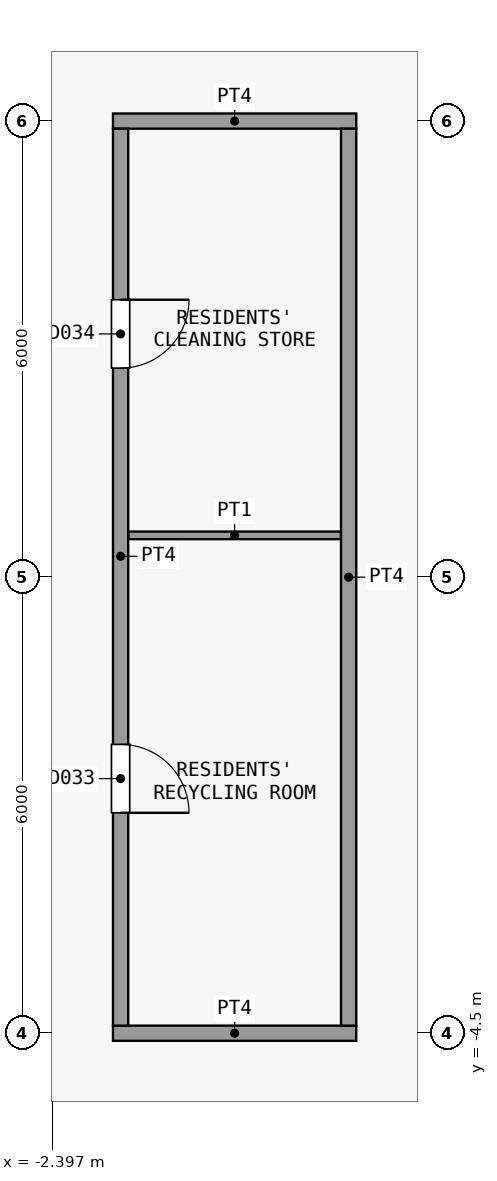
"""IFC4 building model, lengths in metres.
Left out: names, types, materials, properties, quantities, classifications, styles, units other than length and angle.
Written with IfcOpenShell. Run it as: python <this file> out.ifc"""

import sys

from ifc_helpers import new_model, si_unit, direction, frame, frame_2d, origin, place, context, subcontext, project, spatial, rectangle, extrude, element, fill, save


model = new_model("IFC4")
c1 = context("Model", 3, precision=1e-05, world=origin(), true_north=direction((0.0, 1.0)))
c2 = subcontext(c1, "Body", "Model", "MODEL_VIEW")
j1 = project(units=[si_unit("LENGTHUNIT", "METRE"), si_unit("PLANEANGLEUNIT", "RADIAN")], contexts=[c1])
p1 = place(None, origin())
s1 = spatial("IfcSite", under=j1, at=p1, CompositionType="ELEMENT")
p2 = place(p1, origin())
s2 = spatial("IfcBuilding", under=s1, at=p2, CompositionType="ELEMENT")
p3 = place(p2, frame((0.0, 0.0, 170.9)))
s3 = spatial("IfcBuildingStorey", under=s2, at=p3, CompositionType="ELEMENT", Elevation=170.9)
p4 = place(p3, frame((-1.6, -4.5, 0.0), z_axis=(0.0, 0.0, 1.0), x_axis=(1.0, 0.0, 0.0)))
e1 = element("IfcWall", 1, at=p4, inside=s3, PredefinedType="PARTITIONING", context=c2, shape_type="SweptSolid", body=[
    extrude(rectangle(XDim=3.2, YDim=0.2, at=frame_2d((1.6, 0.0))), origin(), (0.0, 0.0, 1.0), 3.3),
])
p5 = place(p3, frame((-1.4, 2.05, 0.0), z_axis=(0.0, 0.0, 1.0), x_axis=(1.0, 0.0, 0.0)))
e2 = element("IfcWall", 2, at=p5, inside=s3, PredefinedType="PARTITIONING", context=c2, shape_type="SweptSolid", body=[
    extrude(rectangle(XDim=2.8, YDim=0.1, at=frame_2d((1.4, 0.0))), origin(), (0.0, 0.0, 1.0), 3.3),
])
p6 = place(p3, frame((-1.6, 7.5, 0.0), z_axis=(0.0, 0.0, 1.0), x_axis=(1.0, 0.0, 0.0)))
e3 = element("IfcWall", 3, at=p6, inside=s3, PredefinedType="PARTITIONING", context=c2, shape_type="SweptSolid", body=[
    extrude(rectangle(XDim=3.2, YDim=0.2, at=frame_2d((1.6, 0.0))), origin(), (0.0, 0.0, 1.0), 3.3),
])
p7 = place(p3, frame((-1.5, -4.4, 0.0), z_axis=(0.0, 0.0, 1.0), x_axis=(0.0, 1.0, 0.0)))
e4 = element("IfcWall", 4, at=p7, inside=s3, PredefinedType="PARTITIONING", context=c2, shape_type="SweptSolid", body=[
    extrude(rectangle(XDim=11.8, YDim=0.2, at=frame_2d((5.9, 0.0))), origin(), (0.0, 0.0, 1.0), 3.3),
])
p8 = place(p7, frame((2.8, 0.0, 0.0)))
e5 = element("IfcOpeningElement", 5, at=p8, cuts=e4, PredefinedType="OPENING", context=c2, shape_type="SweptSolid", body=[
    extrude(rectangle(XDim=0.9, YDim=2.1, at=frame_2d((0.45, 1.05))), frame((0.0, 0.11, 0.0), z_axis=(0.0, -1.0, 0.0), x_axis=(1.0, 0.0, 0.0)), (0.0, 0.0, 1.0), 0.22),
])
p9 = place(p7, frame((8.65, 0.0, 0.0)))
e6 = element("IfcOpeningElement", 6, at=p9, cuts=e4, PredefinedType="OPENING", context=c2, shape_type="SweptSolid", body=[
    extrude(rectangle(XDim=0.9, YDim=2.1, at=frame_2d((0.45, 1.05))), frame((0.0, 0.11, 0.0), z_axis=(0.0, -1.0, 0.0), x_axis=(1.0, 0.0, 0.0)), (0.0, 0.0, 1.0), 0.22),
])
p10 = place(p3, frame((1.5, -4.4, 0.0), z_axis=(0.0, 0.0, 1.0), x_axis=(0.0, 1.0, 0.0)))
e7 = element("IfcWall", 7, at=p10, inside=s3, PredefinedType="PARTITIONING", context=c2, shape_type="SweptSolid", body=[
    extrude(rectangle(XDim=11.8, YDim=0.2, at=frame_2d((5.9, 0.0))), origin(), (0.0, 0.0, 1.0), 3.3),
])
p11 = place(p8, origin())
e8 = element("IfcDoor", 8, at=p11, inside=s3, OperationType="SINGLE_SWING_LEFT", PredefinedType="DOOR", context=c2, shape_type="SweptSolid", body=[
    extrude(rectangle(XDim=0.9, YDim=2.1, at=frame_2d((0.45, 1.05))), frame((0.0, 0.025, 0.0), z_axis=(0.0, -1.0, 0.0), x_axis=(1.0, 0.0, 0.0)), (0.0, 0.0, 1.0), 0.05),
])
fill(e5, e8)
p12 = place(p9, origin())
e9 = element("IfcDoor", 9, at=p12, inside=s3, OperationType="SINGLE_SWING_RIGHT", PredefinedType="DOOR", context=c2, shape_type="SweptSolid", body=[
    extrude(rectangle(XDim=0.9, YDim=2.1, at=frame_2d((0.45, 1.05))), frame((0.0, 0.025, 0.0), z_axis=(0.0, -1.0, 0.0), x_axis=(1.0, 0.0, 0.0)), (0.0, 0.0, 1.0), 0.05),
])
fill(e6, e9)
save(model, sys.argv[1])
